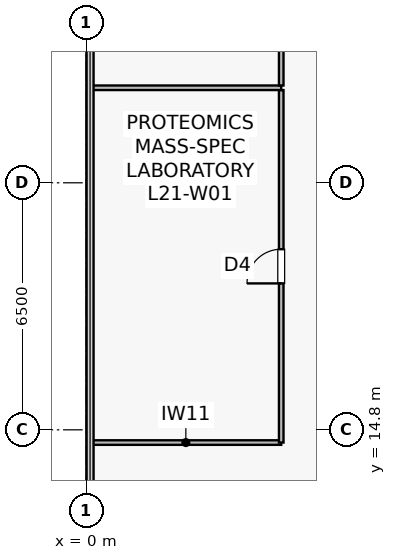
"""IFC4 building model, lengths in metres.
Left out: names, types, materials, properties, quantities, classifications, styles, units other than length and angle.
Written with IfcOpenShell. Run it as: python <this file> out.ifc"""

import sys

from ifc_helpers import new_model, si_unit, direction, frame, frame_2d, origin, place, context, subcontext, project, spatial, rectangle, extrude, source, transform, mapped, element, fill, save


model = new_model("IFC4")
c1 = context("Model", 3, precision=1e-05, world=origin(), true_north=direction((0.0, 1.0)))
c2 = subcontext(c1, "Body", "Model", "MODEL_VIEW")
j1 = project(units=[si_unit("LENGTHUNIT", "METRE"), si_unit("PLANEANGLEUNIT", "RADIAN")], contexts=[c1])
p1 = place(None, origin())
s1 = spatial("IfcSite", under=j1, at=p1, CompositionType="ELEMENT")
p2 = place(p1, origin())
s2 = spatial("IfcBuilding", under=s1, at=p2, CompositionType="ELEMENT")
p3 = place(p2, frame((0.0, 0.0, 86.7)))
s3 = spatial("IfcBuildingStorey", under=s2, at=p3, CompositionType="ELEMENT", Elevation=86.7)
p4 = place(p3, frame((0.11, 14.465, 0.0), z_axis=(0.0, 0.0, 1.0), x_axis=(1.0, 0.0, 0.0)))
e1 = element("IfcWall", 1, at=p4, inside=s3, PredefinedType="PARTITIONING", context=c2, shape_type="SweptSolid", body=[
    extrude(rectangle(XDim=5.02, YDim=0.12, at=frame_2d((2.51, 0.0))), origin(), (0.0, 0.0, 1.0), 3.78),
])
p5 = place(p3, frame((5.13, 14.465, 0.0), z_axis=(0.0, 0.0, 1.0), x_axis=(0.0, 1.0, 0.0)))
e2 = element("IfcWall", 2, at=p5, inside=s3, PredefinedType="PARTITIONING", context=c2, shape_type="SweptSolid", body=[
    extrude(rectangle(XDim=9.275, YDim=0.12, at=frame_2d((4.637, 0.0))), origin(), (0.0, 0.0, 1.0), 3.78),
])
p6 = place(p5, frame((4.188, 0.0, 0.0)))
e3 = element("IfcOpeningElement", 3, at=p6, cuts=e2, PredefinedType="OPENING", context=c2, shape_type="SweptSolid", body=[
    extrude(rectangle(XDim=0.9, YDim=2.1, at=frame_2d((0.45, 1.05))), frame((0.0, 0.07, 0.0), z_axis=(0.0, -1.0, 0.0), x_axis=(1.0, 0.0, 0.0)), (0.0, 0.0, 1.0), 0.14),
])
p7 = place(p3, frame((0.11, 23.8, 0.0), z_axis=(0.0, 0.0, 1.0), x_axis=(1.0, 0.0, 0.0)))
e4 = element("IfcWall", 4, at=p7, inside=s3, PredefinedType="PARTITIONING", context=c2, shape_type="SweptSolid", body=[
    extrude(rectangle(XDim=5.02, YDim=0.12, at=frame_2d((2.51, 0.0))), origin(), (0.0, 0.0, 1.0), 3.78),
])
p8 = place(p3, frame((5.13, 23.86, 0.0), z_axis=(0.0, 0.0, 1.0), x_axis=(0.0, 1.0, 0.0)))
e5 = element("IfcWall", 5, at=p8, inside=s3, PredefinedType="PARTITIONING", context=c2, shape_type="SweptSolid", body=[
    extrude(rectangle(XDim=10.275, YDim=0.12, at=frame_2d((5.137, 0.0))), origin(), (0.0, 0.0, 1.0), 3.78),
])
p9 = place(p8, frame((4.688, 0.0, 0.0)))
e6 = element("IfcOpeningElement", 6, at=p9, cuts=e5, PredefinedType="OPENING", context=c2, shape_type="SweptSolid", body=[
    extrude(rectangle(XDim=0.9, YDim=2.1, at=frame_2d((0.45, 1.05))), frame((0.0, 0.07, 0.0), z_axis=(0.0, -1.0, 0.0), x_axis=(1.0, 0.0, 0.0)), (0.0, 0.0, 1.0), 0.14),
])
m1 = source(origin(), c2, "Body", "SweptSolid", [
    extrude(rectangle(XDim=0.9, YDim=2.1, at=frame_2d((0.45, 1.05))), frame((0.0, 0.025, 0.0), z_axis=(0.0, -1.0, 0.0), x_axis=(1.0, 0.0, 0.0)), (0.0, 0.0, 1.0), 0.05),
])
p10 = place(p6, origin())
e7 = element("IfcDoor", 7, at=p10, inside=s3, OperationType="SINGLE_SWING_LEFT", PredefinedType="DOOR", context=c2, shape_type="MappedRepresentation", body=[
    mapped(m1, transform((0.0, 0.0, 0.0), scale=1.0)),
])
fill(e3, e7)
save(model, sys.argv[1])
